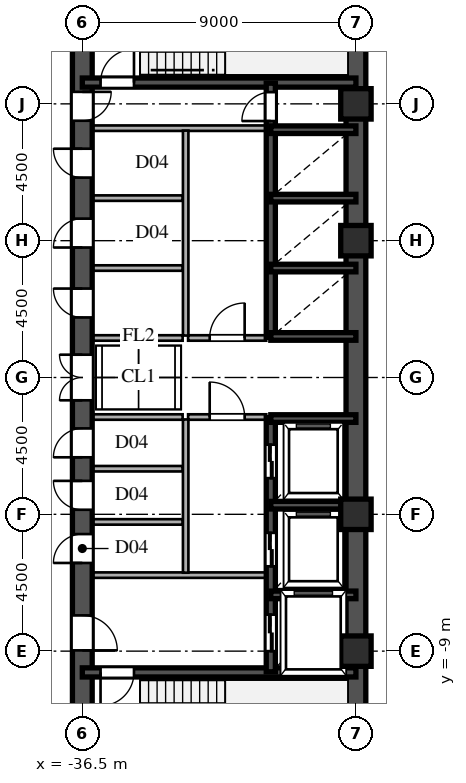
"""IFC4 building model, lengths in metres.
Left out: names, types, materials, properties, quantities, classifications, styles, units other than length and angle.
Written with IfcOpenShell. Run it as: python <this file> out.ifc"""

import sys

from ifc_helpers import new_model, si_unit, direction, frame, frame_2d, origin, origin_2d, place, context, subcontext, project, spatial, rectangle, hollow_rectangle, extrude, source, transform, mapped, element, fill, save


model = new_model("IFC4")
c1 = context("Model", 3, precision=1e-05, world=origin(), true_north=direction((0.0, 1.0)))
c2 = subcontext(c1, "Body", "Model", "MODEL_VIEW")
j1 = project(units=[si_unit("LENGTHUNIT", "METRE"), si_unit("PLANEANGLEUNIT", "RADIAN")], contexts=[c1])
p1 = place(None, origin())
s1 = spatial("IfcSite", under=j1, at=p1, CompositionType="ELEMENT")
p2 = place(p1, origin())
s2 = spatial("IfcBuilding", under=s1, at=p2, CompositionType="ELEMENT")
p3 = place(p2, frame((0.0, 0.0, 99.6)))
s3 = spatial("IfcBuildingStorey", under=s2, at=p3, CompositionType="ELEMENT", Elevation=99.6)
m1 = source(origin(), c2, "Body", "SweptSolid", [
    extrude(hollow_rectangle(XDim=1.0, YDim=1.0, WallThickness=0.042, at=origin_2d()), origin(), (0.0, 0.0, 1.0), 3.6),
])
for number, where, z_axis, x_axis in (
    (1, (-27.5, -9.0, 0.0), (0.0, 0.0, 1.0), (1.0, 0.0, 0.0)),
    (2, (-27.5, -4.5, 0.0), (0.0, 0.0, 1.0), (1.0, 0.0, 0.0)),
    (3, (-27.5, 4.5, 0.0), (0.0, 0.0, 1.0), (1.0, 0.0, 0.0)),
    (4, (-27.5, 9.0, 0.0), (0.0, 0.0, 1.0), (1.0, 0.0, 0.0)),
):
    element("IfcColumn", number, at=place(p3, frame(where, z_axis=z_axis, x_axis=x_axis)), inside=s3, PredefinedType="COLUMN", context=c2, shape_type="MappedRepresentation", body=[
        mapped(m1, transform((0.0, 0.0, 0.0), scale=1.0)),
    ])
for number, where, z_axis, x_axis in (
    (5, (-27.5, -13.5, 0.0), (0.0, 0.0, 1.0), (0.0, 1.0, 0.0)),
    (6, (-27.5, 1.3, 0.0), (0.0, 0.0, 1.0), (0.0, 1.0, 0.0)),
):
    element("IfcWall", number, at=place(p3, frame(where, z_axis=z_axis, x_axis=x_axis)), inside=s3, PredefinedType="SHEAR", context=c2, shape_type="SweptSolid", body=[
        extrude(rectangle(XDim=12.2, YDim=0.65, at=frame_2d((6.1, 0.0))), origin(), (0.0, 0.0, 1.0), 3.38),
    ])
p4 = place(p3, frame((-27.5, -1.3, 0.0), z_axis=(0.0, 0.0, 1.0), x_axis=(0.0, 1.0, 0.0)))
e7 = element("IfcWall", 7, at=p4, inside=s3, PredefinedType="SHEAR", context=c2, shape_type="SweptSolid", body=[
    extrude(rectangle(XDim=2.6, YDim=0.65, at=frame_2d((1.3, 0.0))), origin(), (0.0, 0.0, 1.0), 3.38),
])
p5 = place(p3, frame((-36.5, -13.65, 0.0), z_axis=(0.0, 0.0, 1.0), x_axis=(0.0, 1.0, 0.0)))
e8 = element("IfcWall", 8, at=p5, inside=s3, PredefinedType="SHEAR", context=c2, shape_type="SweptSolid", body=[
    extrude(rectangle(XDim=7.15, YDim=0.65, at=frame_2d((3.575, 0.0))), origin(), (0.0, 0.0, 1.0), 3.38),
])
p6 = place(p5, frame((4.675, 0.0, 0.0)))
e9 = element("IfcOpeningElement", 9, at=p6, cuts=e8, PredefinedType="OPENING", context=c2, shape_type="SweptSolid", body=[
    extrude(rectangle(XDim=1.15, YDim=2.2, at=frame_2d((0.575, 1.1))), frame((0.0, 0.335, 0.0), z_axis=(0.0, -1.0, 0.0), x_axis=(1.0, 0.0, 0.0)), (0.0, 0.0, 1.0), 0.67),
])
p7 = place(p3, frame((-36.5, -1.3, 0.0), z_axis=(0.0, 0.0, 1.0), x_axis=(0.0, 1.0, 0.0)))
e10 = element("IfcWall", 10, at=p7, inside=s3, PredefinedType="SHEAR", context=c2, shape_type="SweptSolid", body=[
    extrude(rectangle(XDim=2.6, YDim=0.65, at=frame_2d((1.3, 0.0))), origin(), (0.0, 0.0, 1.0), 3.38),
])
p8 = place(p7, frame((0.55, 0.0, 0.0)))
e11 = element("IfcOpeningElement", 11, at=p8, cuts=e10, PredefinedType="OPENING", context=c2, shape_type="SweptSolid", body=[
    extrude(rectangle(XDim=1.5, YDim=2.3, at=frame_2d((0.75, 1.15))), frame((0.0, 0.335, 0.0), z_axis=(0.0, -1.0, 0.0), x_axis=(1.0, 0.0, 0.0)), (0.0, 0.0, 1.0), 0.67),
])
p9 = place(p3, frame((-36.5, 8.2, 0.0), z_axis=(0.0, 0.0, 1.0), x_axis=(0.0, 1.0, 0.0)))
e12 = element("IfcWall", 12, at=p9, inside=s3, PredefinedType="SHEAR", context=c2, shape_type="SweptSolid", body=[
    extrude(rectangle(XDim=5.45, YDim=0.65, at=frame_2d((2.725, 0.0))), origin(), (0.0, 0.0, 1.0), 3.38),
])
p10 = place(p9, frame((0.245, 0.0, 0.0)))
e13 = element("IfcOpeningElement", 13, at=p10, cuts=e12, PredefinedType="OPENING", context=c2, shape_type="SweptSolid", body=[
    extrude(rectangle(XDim=0.95, YDim=2.15, at=frame_2d((0.475, 1.075))), frame((0.0, 0.335, 0.0), z_axis=(0.0, -1.0, 0.0), x_axis=(1.0, 0.0, 0.0)), (0.0, 0.0, 1.0), 0.67),
])
p11 = place(p3, frame((-36.5, -6.5, 0.0), z_axis=(0.0, 0.0, 1.0), x_axis=(0.0, 1.0, 0.0)))
e14 = element("IfcWall", 14, at=p11, inside=s3, PredefinedType="SHEAR", context=c2, shape_type="SweptSolid", body=[
    extrude(rectangle(XDim=1.75, YDim=0.65, at=frame_2d((0.875, 0.0))), origin(), (0.0, 0.0, 1.0), 3.38),
])
p12 = place(p11, frame((0.4, 0.0, 0.0)))
e15 = element("IfcOpeningElement", 15, at=p12, cuts=e14, PredefinedType="OPENING", context=c2, shape_type="SweptSolid", body=[
    extrude(rectangle(XDim=0.95, YDim=2.15, at=frame_2d((0.475, 1.075))), frame((0.0, 0.335, 0.0), z_axis=(0.0, -1.0, 0.0), x_axis=(1.0, 0.0, 0.0)), (0.0, 0.0, 1.0), 0.67),
])
p13 = place(p3, frame((-36.5, -4.75, 0.0), z_axis=(0.0, 0.0, 1.0), x_axis=(0.0, 1.0, 0.0)))
e16 = element("IfcWall", 16, at=p13, inside=s3, PredefinedType="SHEAR", context=c2, shape_type="SweptSolid", body=[
    extrude(rectangle(XDim=1.75, YDim=0.65, at=frame_2d((0.875, 0.0))), origin(), (0.0, 0.0, 1.0), 3.38),
])
p14 = place(p13, frame((0.4, 0.0, 0.0)))
e17 = element("IfcOpeningElement", 17, at=p14, cuts=e16, PredefinedType="OPENING", context=c2, shape_type="SweptSolid", body=[
    extrude(rectangle(XDim=0.95, YDim=2.15, at=frame_2d((0.475, 1.075))), frame((0.0, 0.335, 0.0), z_axis=(0.0, -1.0, 0.0), x_axis=(1.0, 0.0, 0.0)), (0.0, 0.0, 1.0), 0.67),
])
p15 = place(p3, frame((-36.5, -3.0, 0.0), z_axis=(0.0, 0.0, 1.0), x_axis=(0.0, 1.0, 0.0)))
e18 = element("IfcWall", 18, at=p15, inside=s3, PredefinedType="SHEAR", context=c2, shape_type="SweptSolid", body=[
    extrude(rectangle(XDim=1.7, YDim=0.65, at=frame_2d((0.85, 0.0))), origin(), (0.0, 0.0, 1.0), 3.38),
])
p16 = place(p15, frame((0.375, 0.0, 0.0)))
e19 = element("IfcOpeningElement", 19, at=p16, cuts=e18, PredefinedType="OPENING", context=c2, shape_type="SweptSolid", body=[
    extrude(rectangle(XDim=0.95, YDim=2.15, at=frame_2d((0.475, 1.075))), frame((0.0, 0.335, 0.0), z_axis=(0.0, -1.0, 0.0), x_axis=(1.0, 0.0, 0.0)), (0.0, 0.0, 1.0), 0.67),
])
p17 = place(p3, frame((-36.5, 1.3, 0.0), z_axis=(0.0, 0.0, 1.0), x_axis=(0.0, 1.0, 0.0)))
e20 = element("IfcWall", 20, at=p17, inside=s3, PredefinedType="SHEAR", context=c2, shape_type="SweptSolid", body=[
    extrude(rectangle(XDim=2.3, YDim=0.65, at=frame_2d((1.15, 0.0))), origin(), (0.0, 0.0, 1.0), 3.38),
])
p18 = place(p17, frame((0.675, 0.0, 0.0)))
e21 = element("IfcOpeningElement", 21, at=p18, cuts=e20, PredefinedType="OPENING", context=c2, shape_type="SweptSolid", body=[
    extrude(rectangle(XDim=0.95, YDim=2.15, at=frame_2d((0.475, 1.075))), frame((0.0, 0.335, 0.0), z_axis=(0.0, -1.0, 0.0), x_axis=(1.0, 0.0, 0.0)), (0.0, 0.0, 1.0), 0.67),
])
p19 = place(p3, frame((-36.5, 3.6, 0.0), z_axis=(0.0, 0.0, 1.0), x_axis=(0.0, 1.0, 0.0)))
e22 = element("IfcWall", 22, at=p19, inside=s3, PredefinedType="SHEAR", context=c2, shape_type="SweptSolid", body=[
    extrude(rectangle(XDim=2.3, YDim=0.65, at=frame_2d((1.15, 0.0))), origin(), (0.0, 0.0, 1.0), 3.38),
])
p20 = place(p19, frame((0.675, 0.0, 0.0)))
e23 = element("IfcOpeningElement", 23, at=p20, cuts=e22, PredefinedType="OPENING", context=c2, shape_type="SweptSolid", body=[
    extrude(rectangle(XDim=0.95, YDim=2.15, at=frame_2d((0.475, 1.075))), frame((0.0, 0.335, 0.0), z_axis=(0.0, -1.0, 0.0), x_axis=(1.0, 0.0, 0.0)), (0.0, 0.0, 1.0), 0.67),
])
p21 = place(p3, frame((-36.5, 5.9, 0.0), z_axis=(0.0, 0.0, 1.0), x_axis=(0.0, 1.0, 0.0)))
e24 = element("IfcWall", 24, at=p21, inside=s3, PredefinedType="SHEAR", context=c2, shape_type="SweptSolid", body=[
    extrude(rectangle(XDim=2.3, YDim=0.65, at=frame_2d((1.15, 0.0))), origin(), (0.0, 0.0, 1.0), 3.38),
])
p22 = place(p21, frame((0.675, 0.0, 0.0)))
e25 = element("IfcOpeningElement", 25, at=p22, cuts=e24, PredefinedType="OPENING", context=c2, shape_type="SweptSolid", body=[
    extrude(rectangle(XDim=0.95, YDim=2.15, at=frame_2d((0.475, 1.075))), frame((0.0, 0.335, 0.0), z_axis=(0.0, -1.0, 0.0), x_axis=(1.0, 0.0, 0.0)), (0.0, 0.0, 1.0), 0.67),
])
p23 = place(p3, frame((-36.5, -9.7, 0.0), z_axis=(0.0, 0.0, 1.0), x_axis=(1.0, 0.0, 0.0)))
e26 = element("IfcWall", 26, at=p23, inside=s3, PredefinedType="SHEAR", context=c2, shape_type="SweptSolid", body=[
    extrude(rectangle(XDim=9.0, YDim=0.3, at=frame_2d((4.5, 0.0))), origin(), (0.0, 0.0, 1.0), 3.38),
])
p24 = place(p23, frame((0.6, 0.0, 0.0)))
e27 = element("IfcOpeningElement", 27, at=p24, cuts=e26, PredefinedType="OPENING", context=c2, shape_type="SweptSolid", body=[
    extrude(rectangle(XDim=1.1, YDim=2.2, at=frame_2d((0.55, 1.1))), frame((0.0, 0.16, 0.0), z_axis=(0.0, -1.0, 0.0), x_axis=(1.0, 0.0, 0.0)), (0.0, 0.0, 1.0), 0.32),
])
p25 = place(p3, frame((-36.5, 9.7, 0.0), z_axis=(0.0, 0.0, 1.0), x_axis=(1.0, 0.0, 0.0)))
e28 = element("IfcWall", 28, at=p25, inside=s3, PredefinedType="SHEAR", context=c2, shape_type="SweptSolid", body=[
    extrude(rectangle(XDim=9.0, YDim=0.3, at=frame_2d((4.5, 0.0))), origin(), (0.0, 0.0, 1.0), 3.38),
])
p26 = place(p25, frame((0.6, 0.0, 0.0)))
e29 = element("IfcOpeningElement", 29, at=p26, cuts=e28, PredefinedType="OPENING", context=c2, shape_type="SweptSolid", body=[
    extrude(rectangle(XDim=1.1, YDim=2.2, at=frame_2d((0.55, 1.1))), frame((0.0, 0.16, 0.0), z_axis=(0.0, -1.0, 0.0), x_axis=(1.0, 0.0, 0.0)), (0.0, 0.0, 1.0), 0.32),
])
for number, where, z_axis, x_axis in (
    (30, (-30.3, -7.15, 0.0), (0.0, 0.0, 1.0), (1.0, 0.0, 0.0)),
    (31, (-30.3, -4.2, 0.0), (0.0, 0.0, 1.0), (1.0, 0.0, 0.0)),
    (32, (-30.3, -1.35, 0.0), (0.0, 0.0, 1.0), (1.0, 0.0, 0.0)),
    (33, (-30.3, 1.35, 0.0), (0.0, 0.0, 1.0), (1.0, 0.0, 0.0)),
    (34, (-30.3, 3.6, 0.0), (0.0, 0.0, 1.0), (1.0, 0.0, 0.0)),
    (35, (-30.3, 5.9, 0.0), (0.0, 0.0, 1.0), (1.0, 0.0, 0.0)),
    (36, (-30.3, 8.15, 0.0), (0.0, 0.0, 1.0), (1.0, 0.0, 0.0)),
):
    element("IfcWall", number, at=place(p3, frame(where, z_axis=z_axis, x_axis=x_axis)), inside=s3, PredefinedType="SHEAR", context=c2, shape_type="SweptSolid", body=[
        extrude(rectangle(XDim=2.8, YDim=0.25, at=frame_2d((1.4, 0.0))), origin(), (0.0, 0.0, 1.0), 3.38),
    ])
p27 = place(p3, frame((-30.3, -9.68, 0.0), z_axis=(0.0, 0.0, 1.0), x_axis=(0.0, 1.0, 0.0)))
e37 = element("IfcWall", 37, at=p27, inside=s3, PredefinedType="SHEAR", context=c2, shape_type="SweptSolid", body=[
    extrude(rectangle(XDim=2.56, YDim=0.3, at=frame_2d((1.28, 0.0))), origin(), (0.0, 0.0, 1.0), 3.38),
])
p28 = place(p27, frame((0.68, 0.0, 0.0)))
e38 = element("IfcOpeningElement", 38, at=p28, cuts=e37, PredefinedType="OPENING", context=c2, shape_type="SweptSolid", body=[
    extrude(rectangle(XDim=1.2, YDim=2.25, at=frame_2d((0.6, 1.125))), frame((0.0, 0.16, 0.0), z_axis=(0.0, -1.0, 0.0), x_axis=(1.0, 0.0, 0.0)), (0.0, 0.0, 1.0), 0.32),
])
p29 = place(p3, frame((-30.3, -7.12, 0.0), z_axis=(0.0, 0.0, 1.0), x_axis=(0.0, 1.0, 0.0)))
e39 = element("IfcWall", 39, at=p29, inside=s3, PredefinedType="SHEAR", context=c2, shape_type="SweptSolid", body=[
    extrude(rectangle(XDim=2.92, YDim=0.3, at=frame_2d((1.46, 0.0))), origin(), (0.0, 0.0, 1.0), 3.38),
])
p30 = place(p29, frame((0.91, 0.0, 0.0)))
e40 = element("IfcOpeningElement", 40, at=p30, cuts=e39, PredefinedType="OPENING", context=c2, shape_type="SweptSolid", body=[
    extrude(rectangle(XDim=1.1, YDim=2.2, at=frame_2d((0.55, 1.1))), frame((0.0, 0.16, 0.0), z_axis=(0.0, -1.0, 0.0), x_axis=(1.0, 0.0, 0.0)), (0.0, 0.0, 1.0), 0.32),
])
p31 = place(p3, frame((-30.3, -4.2, 0.0), z_axis=(0.0, 0.0, 1.0), x_axis=(0.0, 1.0, 0.0)))
e41 = element("IfcWall", 41, at=p31, inside=s3, PredefinedType="SHEAR", context=c2, shape_type="SweptSolid", body=[
    extrude(rectangle(XDim=2.88, YDim=0.3, at=frame_2d((1.44, 0.0))), origin(), (0.0, 0.0, 1.0), 3.38),
])
p32 = place(p31, frame((0.89, 0.0, 0.0)))
e42 = element("IfcOpeningElement", 42, at=p32, cuts=e41, PredefinedType="OPENING", context=c2, shape_type="SweptSolid", body=[
    extrude(rectangle(XDim=1.1, YDim=2.2, at=frame_2d((0.55, 1.1))), frame((0.0, 0.16, 0.0), z_axis=(0.0, -1.0, 0.0), x_axis=(1.0, 0.0, 0.0)), (0.0, 0.0, 1.0), 0.32),
])
p33 = place(p3, frame((-30.3, 1.32, 0.0), z_axis=(0.0, 0.0, 1.0), x_axis=(0.0, 1.0, 0.0)))
e43 = element("IfcWall", 43, at=p33, inside=s3, PredefinedType="SHEAR", context=c2, shape_type="SweptSolid", body=[
    extrude(rectangle(XDim=2.28, YDim=0.3, at=frame_2d((1.14, 0.0))), origin(), (0.0, 0.0, 1.0), 3.38),
])
p34 = place(p3, frame((-30.3, 3.6, 0.0), z_axis=(0.0, 0.0, 1.0), x_axis=(0.0, 1.0, 0.0)))
e44 = element("IfcWall", 44, at=p34, inside=s3, PredefinedType="SHEAR", context=c2, shape_type="SweptSolid", body=[
    extrude(rectangle(XDim=2.3, YDim=0.3, at=frame_2d((1.15, 0.0))), origin(), (0.0, 0.0, 1.0), 3.38),
])
p35 = place(p3, frame((-30.3, 5.9, 0.0), z_axis=(0.0, 0.0, 1.0), x_axis=(0.0, 1.0, 0.0)))
e45 = element("IfcWall", 45, at=p35, inside=s3, PredefinedType="SHEAR", context=c2, shape_type="SweptSolid", body=[
    extrude(rectangle(XDim=2.25, YDim=0.3, at=frame_2d((1.125, 0.0))), origin(), (0.0, 0.0, 1.0), 3.38),
])
p36 = place(p3, frame((-30.3, 8.15, 0.0), z_axis=(0.0, 0.0, 1.0), x_axis=(0.0, 1.0, 0.0)))
e46 = element("IfcWall", 46, at=p36, inside=s3, PredefinedType="SHEAR", context=c2, shape_type="SweptSolid", body=[
    extrude(rectangle(XDim=1.53, YDim=0.3, at=frame_2d((0.765, 0.0))), origin(), (0.0, 0.0, 1.0), 3.38),
])
p37 = place(p36, frame((0.285, 0.0, 0.0)))
e47 = element("IfcOpeningElement", 47, at=p37, cuts=e46, PredefinedType="OPENING", context=c2, shape_type="SweptSolid", body=[
    extrude(rectangle(XDim=0.95, YDim=2.15, at=frame_2d((0.475, 1.075))), frame((0.0, 0.16, 0.0), z_axis=(0.0, -1.0, 0.0), x_axis=(1.0, 0.0, 0.0)), (0.0, 0.0, 1.0), 0.32),
])
for number, where, z_axis, x_axis in (
    (48, (-36.15, -6.5, 0.0), (0.0, 0.0, 1.0), (1.0, 0.0, 0.0)),
    (49, (-36.15, 8.2, 0.0), (0.0, 0.0, 1.0), (1.0, 0.0, 0.0)),
):
    element("IfcWall", number, at=place(p3, frame(where, z_axis=z_axis, x_axis=x_axis)), inside=s3, PredefinedType="PARTITIONING", context=c2, shape_type="SweptSolid", body=[
        extrude(rectangle(XDim=5.7, YDim=0.18, at=frame_2d((2.85, 0.0))), origin(), (0.0, 0.0, 1.0), 3.38),
    ])
p38 = place(p3, frame((-33.1, -6.42, 0.0), z_axis=(0.0, 0.0, 1.0), x_axis=(0.0, 1.0, 0.0)))
e50 = element("IfcWall", 50, at=p38, inside=s3, PredefinedType="PARTITIONING", context=c2, shape_type="SweptSolid", body=[
    extrude(rectangle(XDim=5.04, YDim=0.18, at=frame_2d((2.52, 0.0))), origin(), (0.0, 0.0, 1.0), 3.38),
])
p39 = place(p3, frame((-33.1, 1.38, 0.0), z_axis=(0.0, 0.0, 1.0), x_axis=(0.0, 1.0, 0.0)))
e51 = element("IfcWall", 51, at=p39, inside=s3, PredefinedType="PARTITIONING", context=c2, shape_type="SweptSolid", body=[
    extrude(rectangle(XDim=6.74, YDim=0.18, at=frame_2d((3.37, 0.0))), origin(), (0.0, 0.0, 1.0), 3.38),
])
p40 = place(p3, frame((-33.02, -1.3, 0.0), z_axis=(0.0, 0.0, 1.0), x_axis=(1.0, 0.0, 0.0)))
e52 = element("IfcWall", 52, at=p40, inside=s3, PredefinedType="PARTITIONING", context=c2, shape_type="SweptSolid", body=[
    extrude(rectangle(XDim=2.57, YDim=0.18, at=frame_2d((1.285, 0.0))), origin(), (0.0, 0.0, 1.0), 3.38),
])
p41 = place(p40, frame((0.71, 0.0, 0.0)))
e53 = element("IfcOpeningElement", 53, at=p41, cuts=e52, PredefinedType="OPENING", context=c2, shape_type="SweptSolid", body=[
    extrude(rectangle(XDim=1.15, YDim=2.2, at=frame_2d((0.575, 1.1))), frame((0.0, 0.1, 0.0), z_axis=(0.0, -1.0, 0.0), x_axis=(1.0, 0.0, 0.0)), (0.0, 0.0, 1.0), 0.2),
])
p42 = place(p3, frame((-33.02, 1.3, 0.0), z_axis=(0.0, 0.0, 1.0), x_axis=(1.0, 0.0, 0.0)))
e54 = element("IfcWall", 54, at=p42, inside=s3, PredefinedType="PARTITIONING", context=c2, shape_type="SweptSolid", body=[
    extrude(rectangle(XDim=2.57, YDim=0.18, at=frame_2d((1.285, 0.0))), origin(), (0.0, 0.0, 1.0), 3.38),
])
p43 = place(p42, frame((0.71, 0.0, 0.0)))
e55 = element("IfcOpeningElement", 55, at=p43, cuts=e54, PredefinedType="OPENING", context=c2, shape_type="SweptSolid", body=[
    extrude(rectangle(XDim=1.15, YDim=2.2, at=frame_2d((0.575, 1.1))), frame((0.0, 0.1, 0.0), z_axis=(0.0, -1.0, 0.0), x_axis=(1.0, 0.0, 0.0)), (0.0, 0.0, 1.0), 0.2),
])
for number, where, z_axis, x_axis in (
    (56, (-36.15, -1.3, 0.0), (0.0, 0.0, 1.0), (1.0, 0.0, 0.0)),
    (57, (-36.15, 1.3, 0.0), (0.0, 0.0, 1.0), (1.0, 0.0, 0.0)),
    (58, (-36.15, -4.75, 0.0), (0.0, 0.0, 1.0), (1.0, 0.0, 0.0)),
    (59, (-36.15, -3.0, 0.0), (0.0, 0.0, 1.0), (1.0, 0.0, 0.0)),
    (60, (-36.15, 3.6, 0.0), (0.0, 0.0, 1.0), (1.0, 0.0, 0.0)),
    (61, (-36.15, 5.9, 0.0), (0.0, 0.0, 1.0), (1.0, 0.0, 0.0)),
):
    element("IfcWall", number, at=place(p3, frame(where, z_axis=z_axis, x_axis=x_axis)), inside=s3, PredefinedType="PARTITIONING", context=c2, shape_type="SweptSolid", body=[
        extrude(rectangle(XDim=2.95, YDim=0.18, at=frame_2d((1.475, 0.0))), origin(), (0.0, 0.0, 1.0), 3.38),
    ])
m2 = source(origin(), c2, "Body", "SweptSolid", [
    extrude(rectangle(XDim=1.15, YDim=2.2, at=frame_2d((0.575, 1.1))), frame((0.0, 0.025, 0.0), z_axis=(0.0, -1.0, 0.0), x_axis=(1.0, 0.0, 0.0)), (0.0, 0.0, 1.0), 0.05),
])
p44 = place(p6, frame((1.15, 0.0, 0.0), z_axis=(0.0, 0.0, 1.0), x_axis=(-1.0, 0.0, 0.0)))
e62 = element("IfcDoor", 62, at=p44, inside=s3, OperationType="SINGLE_SWING_LEFT", PredefinedType="DOOR", context=c2, shape_type="MappedRepresentation", body=[
    mapped(m2, transform((0.0, 0.0, 0.0), scale=1.0)),
])
fill(e9, e62)
m3 = source(origin(), c2, "Body", "SweptSolid", [
    extrude(rectangle(XDim=1.5, YDim=2.3, at=frame_2d((0.75, 1.15))), frame((0.0, 0.025, 0.0), z_axis=(0.0, -1.0, 0.0), x_axis=(1.0, 0.0, 0.0)), (0.0, 0.0, 1.0), 0.05),
])
p45 = place(p8, origin())
e63 = element("IfcDoor", 63, at=p45, inside=s3, OperationType="DOUBLE_SWING_LEFT", PredefinedType="DOOR", context=c2, shape_type="MappedRepresentation", body=[
    mapped(m3, transform((0.0, 0.0, 0.0), scale=1.0)),
])
fill(e11, e63)
m4 = source(origin(), c2, "Body", "SweptSolid", [
    extrude(rectangle(XDim=0.95, YDim=2.15, at=frame_2d((0.475, 1.075))), frame((0.0, 0.025, 0.0), z_axis=(0.0, -1.0, 0.0), x_axis=(1.0, 0.0, 0.0)), (0.0, 0.0, 1.0), 0.05),
])
p46 = place(p10, frame((0.95, 0.0, 0.0), z_axis=(0.0, 0.0, 1.0), x_axis=(-1.0, 0.0, 0.0)))
e64 = element("IfcDoor", 64, at=p46, inside=s3, OperationType="SINGLE_SWING_RIGHT", PredefinedType="DOOR", context=c2, shape_type="MappedRepresentation", body=[
    mapped(m4, transform((0.0, 0.0, 0.0), scale=1.0)),
])
fill(e13, e64)
p47 = place(p12, origin())
e65 = element("IfcDoor", 65, at=p47, inside=s3, OperationType="SINGLE_SWING_LEFT", PredefinedType="DOOR", context=c2, shape_type="MappedRepresentation", body=[
    mapped(m4, transform((0.0, 0.0, 0.0), scale=1.0)),
])
fill(e15, e65)
p48 = place(p14, origin())
e66 = element("IfcDoor", 66, at=p48, inside=s3, OperationType="SINGLE_SWING_RIGHT", PredefinedType="DOOR", context=c2, shape_type="MappedRepresentation", body=[
    mapped(m4, transform((0.0, 0.0, 0.0), scale=1.0)),
])
fill(e17, e66)
p49 = place(p16, origin())
e67 = element("IfcDoor", 67, at=p49, inside=s3, OperationType="SINGLE_SWING_LEFT", PredefinedType="DOOR", context=c2, shape_type="MappedRepresentation", body=[
    mapped(m4, transform((0.0, 0.0, 0.0), scale=1.0)),
])
fill(e19, e67)
p50 = place(p18, origin())
e68 = element("IfcDoor", 68, at=p50, inside=s3, OperationType="SINGLE_SWING_RIGHT", PredefinedType="DOOR", context=c2, shape_type="MappedRepresentation", body=[
    mapped(m4, transform((0.0, 0.0, 0.0), scale=1.0)),
])
fill(e21, e68)
p51 = place(p20, origin())
e69 = element("IfcDoor", 69, at=p51, inside=s3, OperationType="SINGLE_SWING_LEFT", PredefinedType="DOOR", context=c2, shape_type="MappedRepresentation", body=[
    mapped(m4, transform((0.0, 0.0, 0.0), scale=1.0)),
])
fill(e23, e69)
p52 = place(p22, origin())
e70 = element("IfcDoor", 70, at=p52, inside=s3, OperationType="SINGLE_SWING_RIGHT", PredefinedType="DOOR", context=c2, shape_type="MappedRepresentation", body=[
    mapped(m4, transform((0.0, 0.0, 0.0), scale=1.0)),
])
fill(e25, e70)
m5 = source(origin(), c2, "Body", "SweptSolid", [
    extrude(rectangle(XDim=1.1, YDim=2.2, at=frame_2d((0.55, 1.1))), frame((0.0, 0.025, 0.0), z_axis=(0.0, -1.0, 0.0), x_axis=(1.0, 0.0, 0.0)), (0.0, 0.0, 1.0), 0.05),
])
p53 = place(p24, frame((1.1, 0.0, 0.0), z_axis=(0.0, 0.0, 1.0), x_axis=(-1.0, 0.0, 0.0)))
e71 = element("IfcDoor", 71, at=p53, inside=s3, OperationType="SINGLE_SWING_LEFT", PredefinedType="DOOR", context=c2, shape_type="MappedRepresentation", body=[
    mapped(m5, transform((0.0, 0.0, 0.0), scale=1.0)),
])
fill(e27, e71)
p54 = place(p26, origin())
e72 = element("IfcDoor", 72, at=p54, inside=s3, OperationType="SINGLE_SWING_RIGHT", PredefinedType="DOOR", context=c2, shape_type="MappedRepresentation", body=[
    mapped(m5, transform((0.0, 0.0, 0.0), scale=1.0)),
])
fill(e29, e72)
m6 = source(origin(), c2, "Body", "SweptSolid", [
    extrude(rectangle(XDim=1.2, YDim=2.25, at=frame_2d((0.6, 1.125))), frame((0.0, 0.025, 0.0), z_axis=(0.0, -1.0, 0.0), x_axis=(1.0, 0.0, 0.0)), (0.0, 0.0, 1.0), 0.05),
])
p55 = place(p28, origin())
e73 = element("IfcDoor", 73, at=p55, inside=s3, OperationType="DOUBLE_DOOR_SLIDING", PredefinedType="DOOR", context=c2, shape_type="MappedRepresentation", body=[
    mapped(m6, transform((0.0, 0.0, 0.0), scale=1.0)),
])
fill(e38, e73)
m7 = source(origin(), c2, "Body", "SweptSolid", [
    extrude(rectangle(XDim=1.1, YDim=2.2, at=frame_2d((0.55, 1.1))), frame((0.0, 0.025, 0.0), z_axis=(0.0, -1.0, 0.0), x_axis=(1.0, 0.0, 0.0)), (0.0, 0.0, 1.0), 0.05),
])
p56 = place(p30, origin())
e74 = element("IfcDoor", 74, at=p56, inside=s3, OperationType="DOUBLE_DOOR_SLIDING", PredefinedType="DOOR", context=c2, shape_type="MappedRepresentation", body=[
    mapped(m7, transform((0.0, 0.0, 0.0), scale=1.0)),
])
fill(e40, e74)
p57 = place(p32, origin())
e75 = element("IfcDoor", 75, at=p57, inside=s3, OperationType="DOUBLE_DOOR_SLIDING", PredefinedType="DOOR", context=c2, shape_type="MappedRepresentation", body=[
    mapped(m7, transform((0.0, 0.0, 0.0), scale=1.0)),
])
fill(e42, e75)
p58 = place(p37, origin())
e76 = element("IfcDoor", 76, at=p58, inside=s3, OperationType="SINGLE_SWING_LEFT", PredefinedType="DOOR", context=c2, shape_type="MappedRepresentation", body=[
    mapped(m4, transform((0.0, 0.0, 0.0), scale=1.0)),
])
fill(e47, e76)
p59 = place(p41, origin())
e77 = element("IfcDoor", 77, at=p59, inside=s3, OperationType="SINGLE_SWING_LEFT", PredefinedType="DOOR", context=c2, shape_type="MappedRepresentation", body=[
    mapped(m2, transform((0.0, 0.0, 0.0), scale=1.0)),
])
fill(e53, e77)
p60 = place(p43, origin())
e78 = element("IfcDoor", 78, at=p60, inside=s3, OperationType="SINGLE_SWING_RIGHT", PredefinedType="DOOR", context=c2, shape_type="MappedRepresentation", body=[
    mapped(m2, transform((0.0, 0.0, 0.0), scale=1.0)),
])
fill(e55, e78)
save(model, sys.argv[1])
